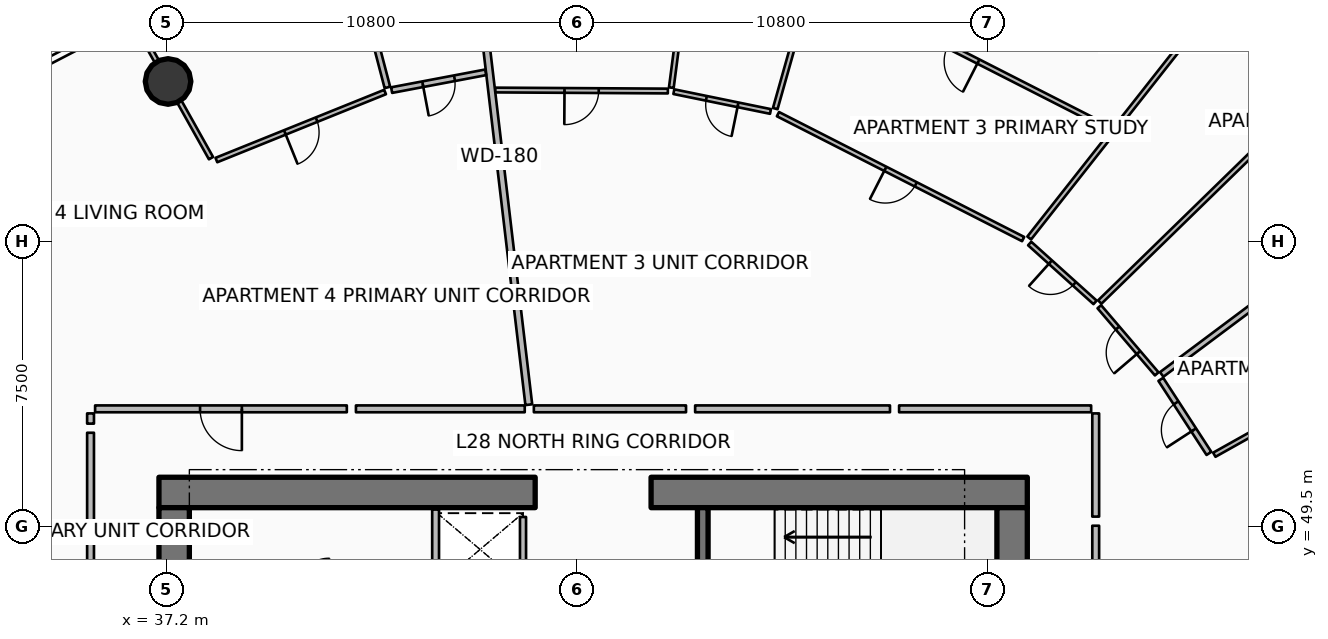
"""IFC4 building model, lengths in metres.
Left out: names, types, materials, properties, quantities, classifications, styles, units other than length and angle.
Written with IfcOpenShell. Run it as: python <this file> out.ifc"""

import sys

from ifc_helpers import new_model, si_unit, direction, frame, frame_2d, origin, origin_2d, place, context, subcontext, project, spatial, rectangle, circle, extrude, element, fill, save


model = new_model("IFC4")
c1 = context("Model", 3, precision=1e-05, world=origin(), true_north=direction((0.0, 1.0)))
c2 = subcontext(c1, "Body", "Model", "MODEL_VIEW")
j1 = project(units=[si_unit("LENGTHUNIT", "METRE"), si_unit("PLANEANGLEUNIT", "RADIAN")], contexts=[c1])
p1 = place(None, origin())
s1 = spatial("IfcSite", under=j1, at=p1, CompositionType="ELEMENT")
p2 = place(p1, origin())
s2 = spatial("IfcBuilding", under=s1, at=p2, CompositionType="ELEMENT")
p3 = place(p2, frame((0.0, 0.0, 112.65)))
s3 = spatial("IfcBuildingStorey", under=s2, at=p3, CompositionType="ELEMENT", Elevation=112.65)
p4 = place(p3, frame((37.0, 50.4, 0.0), z_axis=(0.0, 0.0, 1.0), x_axis=(1.0, 0.0, 0.0)))
e1 = element("IfcWall", 1, at=p4, inside=s3, PredefinedType="SHEAR", context=c2, shape_type="SweptSolid", body=[
    extrude(rectangle(XDim=9.9, YDim=0.8, at=frame_2d((4.95, 0.0))), origin(), (0.0, 0.0, 1.0), 3.75),
])
p5 = place(p3, frame((49.95, 50.4, 0.0), z_axis=(0.0, 0.0, 1.0), x_axis=(1.0, 0.0, 0.0)))
e2 = element("IfcWall", 2, at=p5, inside=s3, PredefinedType="SHEAR", context=c2, shape_type="SweptSolid", body=[
    extrude(rectangle(XDim=9.9, YDim=0.8, at=frame_2d((4.95, 0.0))), origin(), (0.0, 0.0, 1.0), 3.75),
])
for number, where, z_axis, x_axis in (
    (3, (37.4, 34.0, 0.0), (0.0, 0.0, 1.0), (0.0, 1.0, 0.0)),
    (4, (59.45, 34.0, 0.0), (0.0, 0.0, 1.0), (0.0, 1.0, 0.0)),
):
    element("IfcWall", number, at=place(p3, frame(where, z_axis=z_axis, x_axis=x_axis)), inside=s3, PredefinedType="SHEAR", context=c2, shape_type="SweptSolid", body=[
        extrude(rectangle(XDim=16.0, YDim=0.8, at=frame_2d((8.0, 0.0))), origin(), (0.0, 0.0, 1.0), 3.75),
    ])
p6 = place(p3, frame((51.31, 46.5, 0.0), z_axis=(0.0, 0.0, 1.0), x_axis=(0.0, 1.0, 0.0)))
e5 = element("IfcWall", 5, at=p6, inside=s3, PredefinedType="SHEAR", context=c2, shape_type="SweptSolid", body=[
    extrude(rectangle(XDim=3.5, YDim=0.28, at=frame_2d((1.75, 0.0))), origin(), (0.0, 0.0, 1.0), 3.75),
])
p7 = place(p3, frame((64.323, 62.706, 0.0), z_axis=(-0.198457488994, -0.251703806559, 0.947237994818), x_axis=(0.785271109582, -0.619152068926, 0.0)))
e6 = element("IfcColumn", 6, at=p7, inside=s3, PredefinedType="COLUMN", context=c2, shape_type="SweptSolid", body=[
    extrude(circle(Radius=0.6, at=origin_2d()), origin(), (0.0, 0.0, 1.0), 3.664),
])
p8 = place(p3, frame((37.24, 61.214, 0.0), z_axis=(0.132897442347, -0.237292682336, 0.962304760836), x_axis=(0.872484791249, 0.488641268252, 0.0)))
e7 = element("IfcColumn", 7, at=p8, inside=s3, PredefinedType="COLUMN", context=c2, shape_type="SweptSolid", body=[
    extrude(circle(Radius=0.6, at=origin_2d()), origin(), (0.0, 0.0, 1.0), 3.606),
])
p9 = place(p3, frame((46.58, 48.045, 0.0), z_axis=(0.0, 0.0, 1.0), x_axis=(0.0, 1.0, 0.0)))
e8 = element("IfcWall", 8, at=p9, inside=s3, PredefinedType="PARTITIONING", context=c2, shape_type="SweptSolid", body=[
    extrude(rectangle(XDim=1.71, YDim=0.16, at=frame_2d((0.855, 0.0))), origin(), (0.0, 0.0, 1.0), 3.47),
])
p10 = place(p3, frame((44.28, 47.82, 0.0), z_axis=(0.0, 0.0, 1.0), x_axis=(0.0, 1.0, 0.0)))
e9 = element("IfcWall", 9, at=p10, inside=s3, PredefinedType="PARTITIONING", context=c2, shape_type="SweptSolid", body=[
    extrude(rectangle(XDim=2.13, YDim=0.18, at=frame_2d((1.065, 0.0))), origin(), (0.0, 0.0, 1.0), 3.47),
])
p11 = place(p3, frame((46.732, 52.709, 0.0), z_axis=(0.0, 0.0, 1.0), x_axis=(-0.117532311618, 0.993069058891, 0.0)))
e10 = element("IfcWall", 10, at=p11, inside=s3, PredefinedType="PARTITIONING", context=c2, shape_type="SweptSolid", body=[
    extrude(rectangle(XDim=13.138, YDim=0.18, at=frame_2d((6.569, 0.0))), origin(), (0.0, 0.0, 1.0), 2.427),
])
p12 = place(p3, frame((35.094, 45.64, 0.0), z_axis=(0.0, 0.0, 1.0), x_axis=(-0.962454745894, 0.271442189251, 0.0)))
e11 = element("IfcWall", 11, at=p12, inside=s3, PredefinedType="PARTITIONING", context=c2, shape_type="SweptSolid", body=[
    extrude(rectangle(XDim=15.162, YDim=0.18, at=frame_2d((7.581, 0.0))), origin(), (0.0, 0.0, 1.0), 2.427),
])
p13 = place(p3, frame((61.65, 43.736, 0.0), z_axis=(0.0, 0.0, 1.0), x_axis=(0.0, 1.0, 0.0)))
e12 = element("IfcWall", 12, at=p13, inside=s3, PredefinedType="PARTITIONING", context=c2, shape_type="SweptSolid", body=[
    extrude(rectangle(XDim=5.789, YDim=0.18, at=frame_2d((2.895, 0.0))), origin(), (0.0, 0.0, 1.0), 2.427),
])
p14 = place(p13, frame((2.344, 0.0, 0.0)))
e13 = element("IfcOpeningElement", 13, at=p14, cuts=e12, PredefinedType="OPENING", context=c2, shape_type="SweptSolid", body=[
    extrude(rectangle(XDim=1.1, YDim=2.1, at=frame_2d((0.55, 1.05))), frame((0.0, 0.1, 0.0), z_axis=(0.0, -1.0, 0.0), x_axis=(1.0, 0.0, 0.0)), (0.0, 0.0, 1.0), 0.2),
])
p15 = place(p3, frame((61.65, 49.764, 0.0), z_axis=(0.0, 0.0, 1.0), x_axis=(0.0, 1.0, 0.0)))
e14 = element("IfcWall", 14, at=p15, inside=s3, PredefinedType="PARTITIONING", context=c2, shape_type="SweptSolid", body=[
    extrude(rectangle(XDim=2.716, YDim=0.18, at=frame_2d((1.358, 0.0))), origin(), (0.0, 0.0, 1.0), 2.427),
])
p16 = place(p3, frame((61.53, 52.6, 0.0), z_axis=(0.0, 0.0, 1.0), x_axis=(-1.0, 0.0, 0.0)))
e15 = element("IfcWall", 15, at=p16, inside=s3, PredefinedType="PARTITIONING", context=c2, shape_type="SweptSolid", body=[
    extrude(rectangle(XDim=5.054, YDim=0.18, at=frame_2d((2.527, 0.0))), origin(), (0.0, 0.0, 1.0), 2.427),
])
p17 = place(p3, frame((64.771, 51.392, 0.0), z_axis=(0.0, 0.0, 1.0), x_axis=(0.87250073965, 0.488612790776, 0.0)))
e16 = element("IfcWall", 16, at=p17, inside=s3, PredefinedType="PARTITIONING", context=c2, shape_type="SweptSolid", body=[
    extrude(rectangle(XDim=10.258, YDim=0.125, at=frame_2d((5.129, 0.0))), origin(), (0.0, 0.0, 1.0), 2.427),
])
p18 = place(p3, frame((64.629, 51.427, 0.0), z_axis=(0.0, 0.0, 1.0), x_axis=(-0.544940343893, 0.838474818702, 0.0)))
e17 = element("IfcWall", 17, at=p18, inside=s3, PredefinedType="PARTITIONING", context=c2, shape_type="SweptSolid", body=[
    extrude(rectangle(XDim=2.324, YDim=0.15, at=frame_2d((1.162, 0.0))), origin(), (0.0, 0.0, 1.0), 2.427),
])
p19 = place(p18, frame((0.737, 0.0, 0.0)))
e18 = element("IfcOpeningElement", 18, at=p19, cuts=e17, PredefinedType="OPENING", context=c2, shape_type="SweptSolid", body=[
    extrude(rectangle(XDim=0.85, YDim=2.06, at=frame_2d((0.425, 1.03))), frame((0.0, 0.085, 0.0), z_axis=(0.0, -1.0, 0.0), x_axis=(1.0, 0.0, 0.0)), (0.0, 0.0, 1.0), 0.17),
])
p20 = place(p3, frame((63.386, 53.505, 0.0), z_axis=(0.0, 0.0, 1.0), x_axis=(0.800857594538, 0.59885483489, 0.0)))
e19 = element("IfcWall", 19, at=p20, inside=s3, PredefinedType="PARTITIONING", context=c2, shape_type="SweptSolid", body=[
    extrude(rectangle(XDim=3.72, YDim=0.15, at=frame_2d((1.86, 0.0))), origin(), (0.0, 0.0, 1.0), 2.91),
])
p21 = place(p3, frame((61.757, 55.41, 0.0), z_axis=(0.0, 0.0, 1.0), x_axis=(0.716076846126, 0.698021454141, 0.0)))
e20 = element("IfcWall", 20, at=p21, inside=s3, PredefinedType="PARTITIONING", context=c2, shape_type="SweptSolid", body=[
    extrude(rectangle(XDim=9.465, YDim=0.125, at=frame_2d((4.733, 0.0))), origin(), (0.0, 0.0, 1.0), 2.445),
])
p22 = place(p3, frame((63.256, 53.52, 0.0), z_axis=(0.0, 0.0, 1.0), x_axis=(-0.64977038507, 0.760130545818, 0.0)))
e21 = element("IfcWall", 21, at=p22, inside=s3, PredefinedType="PARTITIONING", context=c2, shape_type="SweptSolid", body=[
    extrude(rectangle(XDim=2.325, YDim=0.125, at=frame_2d((1.163, 0.0))), origin(), (0.0, 0.0, 1.0), 2.91),
])
p23 = place(p22, frame((0.738, 0.0, 0.0)))
e22 = element("IfcOpeningElement", 22, at=p23, cuts=e21, PredefinedType="OPENING", context=c2, shape_type="SweptSolid", body=[
    extrude(rectangle(XDim=0.85, YDim=2.06, at=frame_2d((0.425, 1.03))), frame((0.0, 0.073, 0.0), z_axis=(0.0, -1.0, 0.0), x_axis=(1.0, 0.0, 0.0)), (0.0, 0.0, 1.0), 0.145),
])
p24 = place(p3, frame((61.633, 55.401, 0.0), z_axis=(0.0, 0.0, 1.0), x_axis=(-0.743252195533, 0.669011340588, 0.0)))
e23 = element("IfcWall", 23, at=p24, inside=s3, PredefinedType="PARTITIONING", context=c2, shape_type="SweptSolid", body=[
    extrude(rectangle(XDim=2.315, YDim=0.125, at=frame_2d((1.158, 0.0))), origin(), (0.0, 0.0, 1.0), 2.427),
])
p25 = place(p24, frame((0.732, 0.0, 0.0)))
e24 = element("IfcOpeningElement", 24, at=p25, cuts=e23, PredefinedType="OPENING", context=c2, shape_type="SweptSolid", body=[
    extrude(rectangle(XDim=0.85, YDim=2.06, at=frame_2d((0.425, 1.03))), frame((0.0, 0.073, 0.0), z_axis=(0.0, -1.0, 0.0), x_axis=(1.0, 0.0, 0.0)), (0.0, 0.0, 1.0), 0.145),
])
p26 = place(p3, frame((56.236, 52.6, 0.0), z_axis=(0.0, 0.0, 1.0), x_axis=(-1.0, 0.0, 0.0)))
e25 = element("IfcWall", 25, at=p26, inside=s3, PredefinedType="PARTITIONING", context=c2, shape_type="SweptSolid", body=[
    extrude(rectangle(XDim=5.127, YDim=0.18, at=frame_2d((2.563, 0.0))), origin(), (0.0, 0.0, 1.0), 2.427),
])
p27 = place(p3, frame((59.9, 57.095, 0.0), z_axis=(0.0, 0.0, 1.0), x_axis=(0.619086206282, 0.78532303493, 0.0)))
e26 = element("IfcWall", 26, at=p27, inside=s3, PredefinedType="PARTITIONING", context=c2, shape_type="SweptSolid", body=[
    extrude(rectangle(XDim=9.449, YDim=0.125, at=frame_2d((4.725, 0.0))), origin(), (0.0, 0.0, 1.0), 2.427),
])
p28 = place(p3, frame((59.74, 57.067, 0.0), z_axis=(0.0, 0.0, 1.0), x_axis=(-0.890989059737, 0.454024774026, 0.0)))
e27 = element("IfcWall", 27, at=p28, inside=s3, PredefinedType="PARTITIONING", context=c2, shape_type="SweptSolid", body=[
    extrude(rectangle(XDim=7.241, YDim=0.125, at=frame_2d((3.621, 0.0))), origin(), (0.0, 0.0, 1.0), 2.427),
])
p29 = place(p28, frame((3.17, 0.0, 0.0)))
e28 = element("IfcOpeningElement", 28, at=p29, cuts=e27, PredefinedType="OPENING", context=c2, shape_type="SweptSolid", body=[
    extrude(rectangle(XDim=0.9, YDim=2.08, at=frame_2d((0.45, 1.04))), frame((0.0, 0.073, 0.0), z_axis=(0.0, -1.0, 0.0), x_axis=(1.0, 0.0, 0.0)), (0.0, 0.0, 1.0), 0.145),
])
p30 = place(p3, frame((62.03, 59.971, 0.0), z_axis=(0.0, 0.0, 1.0), x_axis=(-0.890999587891, 0.454004112733, 0.0)))
e29 = element("IfcWall", 29, at=p30, inside=s3, PredefinedType="PARTITIONING", context=c2, shape_type="SweptSolid", body=[
    extrude(rectangle(XDim=8.684, YDim=0.125, at=frame_2d((4.342, 0.0))), origin(), (0.0, 0.0, 1.0), 2.427),
])
p31 = place(p30, frame((3.892, 0.0, 0.0)))
e30 = element("IfcOpeningElement", 30, at=p31, cuts=e29, PredefinedType="OPENING", context=c2, shape_type="SweptSolid", body=[
    extrude(rectangle(XDim=0.9, YDim=2.08, at=frame_2d((0.45, 1.04))), frame((0.0, 0.073, 0.0), z_axis=(0.0, -1.0, 0.0), x_axis=(1.0, 0.0, 0.0)), (0.0, 0.0, 1.0), 0.145),
])
p32 = place(p3, frame((50.869, 52.6, 0.0), z_axis=(0.0, 0.0, 1.0), x_axis=(-1.0, 0.0, 0.0)))
e31 = element("IfcWall", 31, at=p32, inside=s3, PredefinedType="PARTITIONING", context=c2, shape_type="SweptSolid", body=[
    extrude(rectangle(XDim=4.004, YDim=0.18, at=frame_2d((2.002, 0.0))), origin(), (0.0, 0.0, 1.0), 2.427),
])
p33 = place(p3, frame((53.218, 60.5, 0.0), z_axis=(0.0, 0.0, 1.0), x_axis=(0.271465195742, 0.962448257051, 0.0)))
e32 = element("IfcWall", 32, at=p33, inside=s3, PredefinedType="PARTITIONING", context=c2, shape_type="SweptSolid", body=[
    extrude(rectangle(XDim=6.916, YDim=0.125, at=frame_2d((3.458, 0.0))), origin(), (0.0, 0.0, 1.0), 2.427),
])
p34 = place(p3, frame((50.483, 61.051, 0.0), z_axis=(0.0, 0.0, 1.0), x_axis=(0.129219331313, 0.991616036788, 0.0)))
e33 = element("IfcWall", 33, at=p34, inside=s3, PredefinedType="PARTITIONING", context=c2, shape_type="SweptSolid", body=[
    extrude(rectangle(XDim=5.66, YDim=0.125, at=frame_2d((2.83, 0.0))), origin(), (0.0, 0.0, 1.0), 2.445),
])
p35 = place(p3, frame((53.093, 60.424, 0.0), z_axis=(0.0, 0.0, 1.0), x_axis=(-0.97963259615, 0.200798348001, 0.0)))
e34 = element("IfcWall", 34, at=p35, inside=s3, PredefinedType="PARTITIONING", context=c2, shape_type="SweptSolid", body=[
    extrude(rectangle(XDim=2.596, YDim=0.125, at=frame_2d((1.298, 0.0))), origin(), (0.0, 0.0, 1.0), 2.427),
])
p36 = place(p35, frame((0.873, 0.0, 0.0)))
e35 = element("IfcOpeningElement", 35, at=p36, cuts=e34, PredefinedType="OPENING", context=c2, shape_type="SweptSolid", body=[
    extrude(rectangle(XDim=0.85, YDim=2.06, at=frame_2d((0.425, 1.03))), frame((0.0, 0.073, 0.0), z_axis=(0.0, -1.0, 0.0), x_axis=(1.0, 0.0, 0.0)), (0.0, 0.0, 1.0), 0.145),
])
p37 = place(p3, frame((50.391, 60.962, 0.0), z_axis=(0.0, 0.0, 1.0), x_axis=(-0.999982495953, 0.005916737914, 0.0)))
e36 = element("IfcWall", 36, at=p37, inside=s3, PredefinedType="PARTITIONING", context=c2, shape_type="SweptSolid", body=[
    extrude(rectangle(XDim=4.539, YDim=0.125, at=frame_2d((2.27, 0.0))), origin(), (0.0, 0.0, 1.0), 2.427),
])
p38 = place(p37, frame((1.819, 0.0, 0.0)))
e37 = element("IfcOpeningElement", 37, at=p38, cuts=e36, PredefinedType="OPENING", context=c2, shape_type="SweptSolid", body=[
    extrude(rectangle(XDim=0.9, YDim=2.08, at=frame_2d((0.45, 1.04))), frame((0.0, 0.073, 0.0), z_axis=(0.0, -1.0, 0.0), x_axis=(1.0, 0.0, 0.0)), (0.0, 0.0, 1.0), 0.145),
])
p39 = place(p3, frame((41.944, 52.6, 0.0), z_axis=(0.0, 0.0, 1.0), x_axis=(-1.0, 0.0, 0.0)))
e38 = element("IfcWall", 38, at=p39, inside=s3, PredefinedType="PARTITIONING", context=c2, shape_type="SweptSolid", body=[
    extrude(rectangle(XDim=6.624, YDim=0.18, at=frame_2d((3.312, 0.0))), origin(), (0.0, 0.0, 1.0), 2.427),
])
p40 = place(p39, frame((2.762, 0.0, 0.0)))
e39 = element("IfcOpeningElement", 39, at=p40, cuts=e38, PredefinedType="OPENING", context=c2, shape_type="SweptSolid", body=[
    extrude(rectangle(XDim=1.1, YDim=2.1, at=frame_2d((0.55, 1.05))), frame((0.0, 0.1, 0.0), z_axis=(0.0, -1.0, 0.0), x_axis=(1.0, 0.0, 0.0)), (0.0, 0.0, 1.0), 0.2),
])
p41 = place(p3, frame((35.2, 52.48, 0.0), z_axis=(0.0, 0.0, 1.0), x_axis=(0.0, -1.0, 0.0)))
e40 = element("IfcWall", 40, at=p41, inside=s3, PredefinedType="PARTITIONING", context=c2, shape_type="SweptSolid", body=[
    extrude(rectangle(XDim=0.269, YDim=0.18, at=frame_2d((0.135, 0.0))), origin(), (0.0, 0.0, 1.0), 2.427),
])
p42 = place(p3, frame((46.625, 52.6, 0.0), z_axis=(0.0, 0.0, 1.0), x_axis=(-1.0, 0.0, 0.0)))
e41 = element("IfcWall", 41, at=p42, inside=s3, PredefinedType="PARTITIONING", context=c2, shape_type="SweptSolid", body=[
    extrude(rectangle(XDim=4.442, YDim=0.18, at=frame_2d((2.221, 0.0))), origin(), (0.0, 0.0, 1.0), 2.427),
])
p43 = place(p3, frame((38.37, 59.196, 0.0), z_axis=(0.0, 0.0, 1.0), x_axis=(-0.488603368932, 0.87250601595, 0.0)))
e42 = element("IfcWall", 42, at=p43, inside=s3, PredefinedType="PARTITIONING", context=c2, shape_type="SweptSolid", body=[
    extrude(rectangle(XDim=4.113, YDim=0.125, at=frame_2d((2.057, 0.0))), origin(), (0.0, 0.0, 1.0), 2.427),
])
p44 = place(p3, frame((45.597, 61.455, 0.0), z_axis=(0.0, 0.0, 1.0), x_axis=(-0.982581250532, -0.18583349026, 0.0)))
e43 = element("IfcWall", 43, at=p44, inside=s3, PredefinedType="PARTITIONING", context=c2, shape_type="SweptSolid", body=[
    extrude(rectangle(XDim=2.519, YDim=0.15, at=frame_2d((1.259, 0.0))), origin(), (0.0, 0.0, 1.0), 2.427),
])
p45 = place(p44, frame((0.834, 0.0, 0.0)))
e44 = element("IfcOpeningElement", 44, at=p45, cuts=e43, PredefinedType="OPENING", context=c2, shape_type="SweptSolid", body=[
    extrude(rectangle(XDim=0.85, YDim=2.06, at=frame_2d((0.425, 1.03))), frame((0.0, 0.085, 0.0), z_axis=(0.0, -1.0, 0.0), x_axis=(1.0, 0.0, 0.0)), (0.0, 0.0, 1.0), 0.17),
])
p46 = place(p3, frame((43.011, 61.057, 0.0), z_axis=(0.0, 0.0, 1.0), x_axis=(-0.2532403996, 0.967403380194, 0.0)))
e45 = element("IfcWall", 45, at=p46, inside=s3, PredefinedType="PARTITIONING", context=c2, shape_type="SweptSolid", body=[
    extrude(rectangle(XDim=3.703, YDim=0.15, at=frame_2d((1.852, 0.0))), origin(), (0.0, 0.0, 1.0), 2.445),
])
p47 = place(p3, frame((42.95, 60.936, 0.0), z_axis=(0.0, 0.0, 1.0), x_axis=(-0.927456594122, -0.373930830529, 0.0)))
e46 = element("IfcWall", 46, at=p47, inside=s3, PredefinedType="PARTITIONING", context=c2, shape_type="SweptSolid", body=[
    extrude(rectangle(XDim=4.786, YDim=0.125, at=frame_2d((2.393, 0.0))), origin(), (0.0, 0.0, 1.0), 2.427),
])
p48 = place(p47, frame((1.943, 0.0, 0.0)))
e47 = element("IfcOpeningElement", 47, at=p48, cuts=e46, PredefinedType="OPENING", context=c2, shape_type="SweptSolid", body=[
    extrude(rectangle(XDim=0.9, YDim=2.08, at=frame_2d((0.45, 1.04))), frame((0.0, 0.073, 0.0), z_axis=(0.0, -1.0, 0.0), x_axis=(1.0, 0.0, 0.0)), (0.0, 0.0, 1.0), 0.145),
])
p49 = place(p3, frame((35.2, 51.971, 0.0), z_axis=(0.0, 0.0, 1.0), x_axis=(0.0, -1.0, 0.0)))
e48 = element("IfcWall", 48, at=p49, inside=s3, PredefinedType="PARTITIONING", context=c2, shape_type="SweptSolid", body=[
    extrude(rectangle(XDim=6.241, YDim=0.18, at=frame_2d((3.12, 0.0))), origin(), (0.0, 0.0, 1.0), 2.427),
])
p50 = place(p19, origin())
e49 = element("IfcDoor", 49, at=p50, inside=s3, OperationType="SINGLE_SWING_LEFT", PredefinedType="DOOR", context=c2, shape_type="SweptSolid", body=[
    extrude(rectangle(XDim=0.85, YDim=2.06, at=frame_2d((0.425, 1.03))), frame((0.0, 0.025, 0.0), z_axis=(0.0, -1.0, 0.0), x_axis=(1.0, 0.0, 0.0)), (0.0, 0.0, 1.0), 0.05),
])
fill(e18, e49)
p51 = place(p23, origin())
e50 = element("IfcDoor", 50, at=p51, inside=s3, OperationType="SINGLE_SWING_LEFT", PredefinedType="DOOR", context=c2, shape_type="SweptSolid", body=[
    extrude(rectangle(XDim=0.85, YDim=2.06, at=frame_2d((0.425, 1.03))), frame((0.0, 0.025, 0.0), z_axis=(0.0, -1.0, 0.0), x_axis=(1.0, 0.0, 0.0)), (0.0, 0.0, 1.0), 0.05),
])
fill(e22, e50)
p52 = place(p25, origin())
e51 = element("IfcDoor", 51, at=p52, inside=s3, OperationType="SINGLE_SWING_RIGHT", PredefinedType="DOOR", context=c2, shape_type="SweptSolid", body=[
    extrude(rectangle(XDim=0.85, YDim=2.06, at=frame_2d((0.425, 1.03))), frame((0.0, 0.025, 0.0), z_axis=(0.0, -1.0, 0.0), x_axis=(1.0, 0.0, 0.0)), (0.0, 0.0, 1.0), 0.05),
])
fill(e24, e51)
p53 = place(p29, origin())
e52 = element("IfcDoor", 52, at=p53, inside=s3, OperationType="SINGLE_SWING_RIGHT", PredefinedType="DOOR", context=c2, shape_type="SweptSolid", body=[
    extrude(rectangle(XDim=0.9, YDim=2.08, at=frame_2d((0.45, 1.04))), frame((0.0, 0.025, 0.0), z_axis=(0.0, -1.0, 0.0), x_axis=(1.0, 0.0, 0.0)), (0.0, 0.0, 1.0), 0.05),
])
fill(e28, e52)
p54 = place(p31, origin())
e53 = element("IfcDoor", 53, at=p54, inside=s3, OperationType="SINGLE_SWING_LEFT", PredefinedType="DOOR", context=c2, shape_type="SweptSolid", body=[
    extrude(rectangle(XDim=0.9, YDim=2.08, at=frame_2d((0.45, 1.04))), frame((0.0, 0.025, 0.0), z_axis=(0.0, -1.0, 0.0), x_axis=(1.0, 0.0, 0.0)), (0.0, 0.0, 1.0), 0.05),
])
fill(e30, e53)
p55 = place(p36, origin())
e54 = element("IfcDoor", 54, at=p55, inside=s3, OperationType="SINGLE_SWING_LEFT", PredefinedType="DOOR", context=c2, shape_type="SweptSolid", body=[
    extrude(rectangle(XDim=0.85, YDim=2.06, at=frame_2d((0.425, 1.03))), frame((0.0, 0.025, 0.0), z_axis=(0.0, -1.0, 0.0), x_axis=(1.0, 0.0, 0.0)), (0.0, 0.0, 1.0), 0.05),
])
fill(e35, e54)
p56 = place(p38, origin())
e55 = element("IfcDoor", 55, at=p56, inside=s3, OperationType="SINGLE_SWING_RIGHT", PredefinedType="DOOR", context=c2, shape_type="SweptSolid", body=[
    extrude(rectangle(XDim=0.9, YDim=2.08, at=frame_2d((0.45, 1.04))), frame((0.0, 0.025, 0.0), z_axis=(0.0, -1.0, 0.0), x_axis=(1.0, 0.0, 0.0)), (0.0, 0.0, 1.0), 0.05),
])
fill(e37, e55)
p57 = place(p40, origin())
e56 = element("IfcDoor", 56, at=p57, inside=s3, OperationType="SINGLE_SWING_LEFT", PredefinedType="DOOR", context=c2, shape_type="SweptSolid", body=[
    extrude(rectangle(XDim=1.1, YDim=2.1, at=frame_2d((0.55, 1.05))), frame((0.0, 0.025, 0.0), z_axis=(0.0, -1.0, 0.0), x_axis=(1.0, 0.0, 0.0)), (0.0, 0.0, 1.0), 0.05),
])
fill(e39, e56)
p58 = place(p45, origin())
e57 = element("IfcDoor", 57, at=p58, inside=s3, OperationType="SINGLE_SWING_RIGHT", PredefinedType="DOOR", context=c2, shape_type="SweptSolid", body=[
    extrude(rectangle(XDim=0.85, YDim=2.06, at=frame_2d((0.425, 1.03))), frame((0.0, 0.025, 0.0), z_axis=(0.0, -1.0, 0.0), x_axis=(1.0, 0.0, 0.0)), (0.0, 0.0, 1.0), 0.05),
])
fill(e44, e57)
p59 = place(p48, origin())
e58 = element("IfcDoor", 58, at=p59, inside=s3, OperationType="SINGLE_SWING_RIGHT", PredefinedType="DOOR", context=c2, shape_type="SweptSolid", body=[
    extrude(rectangle(XDim=0.9, YDim=2.08, at=frame_2d((0.45, 1.04))), frame((0.0, 0.025, 0.0), z_axis=(0.0, -1.0, 0.0), x_axis=(1.0, 0.0, 0.0)), (0.0, 0.0, 1.0), 0.05),
])
fill(e47, e58)
save(model, sys.argv[1])
